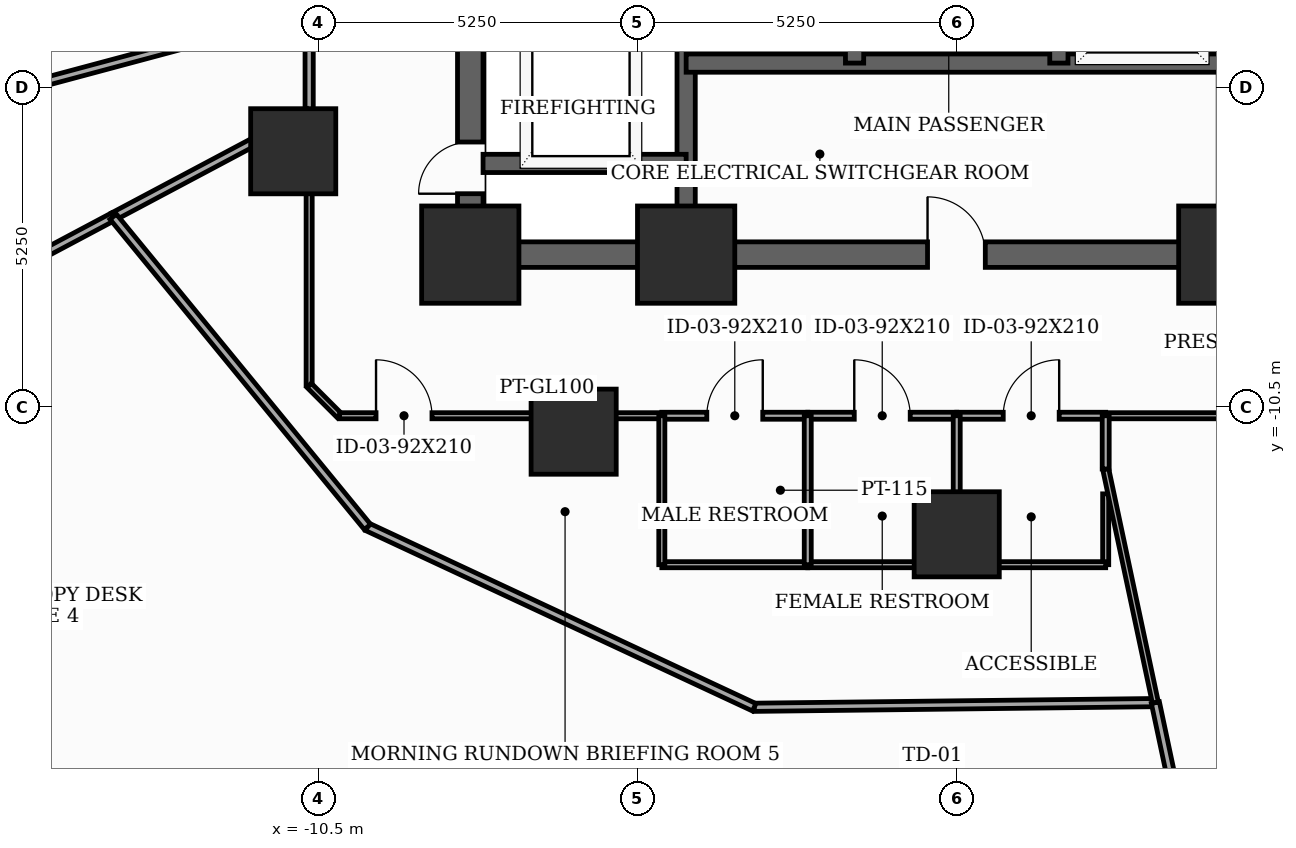
"""IFC4 building model, lengths in metres.
Left out: names, types, materials, properties, quantities, classifications, styles, units other than length and angle.
Written with IfcOpenShell. Run it as: python <this file> out.ifc"""

import sys

from ifc_helpers import new_model, si_unit, direction, frame, frame_2d, origin, origin_2d, place, context, subcontext, project, spatial, rectangle, extrude, element, fill, save


model = new_model("IFC4")
c1 = context("Model", 3, precision=1e-05, world=origin(), true_north=direction((0.0, 1.0)))
c2 = subcontext(c1, "Body", "Model", "MODEL_VIEW")
j1 = project(units=[si_unit("LENGTHUNIT", "METRE"), si_unit("PLANEANGLEUNIT", "RADIAN")], contexts=[c1])
p1 = place(None, origin())
s1 = spatial("IfcSite", under=j1, at=p1, CompositionType="ELEMENT")
p2 = place(p1, origin())
s2 = spatial("IfcBuilding", under=s1, at=p2, CompositionType="ELEMENT")
p3 = place(p2, frame((0.0, 0.0, 29.7)))
s3 = spatial("IfcBuildingStorey", under=s2, at=p3, CompositionType="ELEMENT", Elevation=29.7)
for number, where, z_axis, x_axis in (
    (1, (-8.0, -8.0, 0.0), (0.0, 0.0, 1.0), (1.0, 0.0, 0.0)),
    (2, (-4.45, -8.0, 0.0), (0.0, 0.0, 1.0), (1.0, 0.0, 0.0)),
    (3, (4.45, -8.0, 0.0), (0.0, 0.0, 1.0), (1.0, 0.0, 0.0)),
):
    element("IfcColumn", number, at=place(p3, frame(where, z_axis=z_axis, x_axis=x_axis)), inside=s3, PredefinedType="COLUMN", context=c2, shape_type="SweptSolid", body=[
        extrude(rectangle(XDim=1.6, YDim=1.6, at=origin_2d()), origin(), (0.0, 0.0, 1.0), 3.7),
    ])
for number, where, z_axis, x_axis in (
    (4, (-10.912, -6.3, 0.0), (0.0, 0.0, 1.0), (1.0, 0.0, 0.0)),
    (5, (-6.3, -10.912, 0.0), (0.0, 0.0, 1.0), (1.0, 0.0, 0.0)),
    (6, (0.0, -12.6, 0.0), (0.0, 0.0, 1.0), (1.0, 0.0, 0.0)),
):
    element("IfcColumn", number, at=place(p3, frame(where, z_axis=z_axis, x_axis=x_axis)), inside=s3, PredefinedType="COLUMN", context=c2, shape_type="SweptSolid", body=[
        extrude(rectangle(XDim=1.4, YDim=1.4, at=origin_2d()), origin(), (0.0, 0.0, 1.0), 3.7),
    ])
p4 = place(p3, frame((-8.0, -8.0, 0.0), z_axis=(0.0, 0.0, 1.0), x_axis=(0.0, 1.0, 0.0)))
e7 = element("IfcWall", 7, at=p4, inside=s3, PredefinedType="SHEAR", context=c2, shape_type="SweptSolid", body=[
    extrude(rectangle(XDim=16.0, YDim=0.42, at=frame_2d((8.0, 0.0))), origin(), (0.0, 0.0, 1.0), 3.5),
])
p5 = place(p4, frame((1.002, 0.0, 0.0)))
e8 = element("IfcOpeningElement", 8, at=p5, cuts=e7, PredefinedType="OPENING", context=c2, shape_type="SweptSolid", body=[
    extrude(rectangle(XDim=0.85, YDim=2.02, at=frame_2d((0.425, 1.01))), frame((0.0, 0.22, 0.0), z_axis=(0.0, -1.0, 0.0), x_axis=(1.0, 0.0, 0.0)), (0.0, 0.0, 1.0), 0.44),
])
p6 = place(p4, frame((5.35, 0.0, 0.0)))
e9 = element("IfcOpeningElement", 9, at=p6, cuts=e7, PredefinedType="OPENING", context=c2, shape_type="SweptSolid", body=[
    extrude(rectangle(XDim=1.05, YDim=2.15, at=frame_2d((0.525, 1.075))), frame((0.0, 0.22, 0.0), z_axis=(0.0, -1.0, 0.0), x_axis=(1.0, 0.0, 0.0)), (0.0, 0.0, 1.0), 0.44),
])
p7 = place(p3, frame((-8.0, -8.0, 0.0), z_axis=(0.0, 0.0, 1.0), x_axis=(1.0, 0.0, 0.0)))
e10 = element("IfcWall", 10, at=p7, inside=s3, PredefinedType="SHEAR", context=c2, shape_type="SweptSolid", body=[
    extrude(rectangle(XDim=16.0, YDim=0.42, at=frame_2d((8.0, 0.0))), origin(), (0.0, 0.0, 1.0), 3.5),
])
p8 = place(p7, frame((7.52, 0.0, 0.0)))
e11 = element("IfcOpeningElement", 11, at=p8, cuts=e10, PredefinedType="OPENING", context=c2, shape_type="SweptSolid", body=[
    extrude(rectangle(XDim=0.95, YDim=2.1, at=frame_2d((0.475, 1.05))), frame((0.0, 0.22, 0.0), z_axis=(0.0, -1.0, 0.0), x_axis=(1.0, 0.0, 0.0)), (0.0, 0.0, 1.0), 0.44),
])
p9 = place(p3, frame((-4.45, -7.79, 0.0), z_axis=(0.0, 0.0, 1.0), x_axis=(0.0, 1.0, 0.0)))
e12 = element("IfcWall", 12, at=p9, inside=s3, PredefinedType="SHEAR", context=c2, shape_type="SweptSolid", body=[
    extrude(rectangle(XDim=15.58, YDim=0.3, at=frame_2d((7.79, 0.0))), origin(), (0.0, 0.0, 1.0), 3.5),
])
p10 = place(p3, frame((-7.79, -6.5, 0.0), z_axis=(0.0, 0.0, 1.0), x_axis=(1.0, 0.0, 0.0)))
e13 = element("IfcWall", 13, at=p10, inside=s3, PredefinedType="SHEAR", context=c2, shape_type="SweptSolid", body=[
    extrude(rectangle(XDim=3.34, YDim=0.3, at=frame_2d((1.67, 0.0))), origin(), (0.0, 0.0, 1.0), 3.5),
])
p11 = place(p3, frame((-4.45, -4.85, 0.0), z_axis=(0.0, 0.0, 1.0), x_axis=(1.0, 0.0, 0.0)))
e14 = element("IfcWall", 14, at=p11, inside=s3, PredefinedType="SHEAR", context=c2, shape_type="SweptSolid", body=[
    extrude(rectangle(XDim=8.9, YDim=0.3, at=frame_2d((4.45, 0.0))), origin(), (0.0, 0.0, 1.0), 3.5),
])
p12 = place(p3, frame((-1.68, -4.85, 0.0), z_axis=(0.0, 0.0, 1.0), x_axis=(0.0, 1.0, 0.0)))
e15 = element("IfcWall", 15, at=p12, inside=s3, PredefinedType="SHEAR", context=c2, shape_type="SweptSolid", body=[
    extrude(rectangle(XDim=12.64, YDim=0.3, at=frame_2d((6.32, 0.0))), origin(), (0.0, 0.0, 1.0), 3.5),
])
p13 = place(p12, frame((3.95, 0.0, 0.0)))
e16 = element("IfcOpeningElement", 16, at=p13, cuts=e15, PredefinedType="OPENING", context=c2, shape_type="SweptSolid", body=[
    extrude(rectangle(XDim=1.1, YDim=2.1, at=frame_2d((0.55, 1.05))), frame((0.0, 0.16, 0.0), z_axis=(0.0, -1.0, 0.0), x_axis=(1.0, 0.0, 0.0)), (0.0, 0.0, 1.0), 0.32),
])
p14 = place(p12, frame((6.25, 0.0, 0.0)))
e17 = element("IfcOpeningElement", 17, at=p14, cuts=e15, PredefinedType="OPENING", context=c2, shape_type="SweptSolid", body=[
    extrude(rectangle(XDim=1.1, YDim=2.1, at=frame_2d((0.55, 1.05))), frame((0.0, 0.16, 0.0), z_axis=(0.0, -1.0, 0.0), x_axis=(1.0, 0.0, 0.0)), (0.0, 0.0, 1.0), 0.32),
])
p15 = place(p12, frame((8.55, 0.0, 0.0)))
e18 = element("IfcOpeningElement", 18, at=p15, cuts=e15, PredefinedType="OPENING", context=c2, shape_type="SweptSolid", body=[
    extrude(rectangle(XDim=1.1, YDim=2.1, at=frame_2d((0.55, 1.05))), frame((0.0, 0.16, 0.0), z_axis=(0.0, -1.0, 0.0), x_axis=(1.0, 0.0, 0.0)), (0.0, 0.0, 1.0), 0.32),
])
p16 = place(p12, frame((10.85, 0.0, 0.0)))
e19 = element("IfcOpeningElement", 19, at=p16, cuts=e15, PredefinedType="OPENING", context=c2, shape_type="SweptSolid", body=[
    extrude(rectangle(XDim=1.1, YDim=2.1, at=frame_2d((0.55, 1.05))), frame((0.0, 0.16, 0.0), z_axis=(0.0, -1.0, 0.0), x_axis=(1.0, 0.0, 0.0)), (0.0, 0.0, 1.0), 0.32),
])
p17 = place(p12, frame((1.15, 0.0, 0.0)))
e20 = element("IfcOpeningElement", 20, at=p17, cuts=e15, PredefinedType="OPENING", context=c2, shape_type="SweptSolid", body=[
    extrude(rectangle(XDim=0.92, YDim=2.1, at=frame_2d((0.46, 1.05))), frame((0.0, 0.16, 0.0), z_axis=(0.0, -1.0, 0.0), x_axis=(1.0, 0.0, 0.0)), (0.0, 0.0, 1.0), 0.32),
])
p18 = place(p3, frame((1.68, -4.85, 0.0), z_axis=(0.0, 0.0, 1.0), x_axis=(0.0, 1.0, 0.0)))
e21 = element("IfcWall", 21, at=p18, inside=s3, PredefinedType="SHEAR", context=c2, shape_type="SweptSolid", body=[
    extrude(rectangle(XDim=12.64, YDim=0.3, at=frame_2d((6.32, 0.0))), origin(), (0.0, 0.0, 1.0), 3.5),
])
p19 = place(p18, frame((0.55, 0.0, 0.0)))
e22 = element("IfcOpeningElement", 22, at=p19, cuts=e21, PredefinedType="OPENING", context=c2, shape_type="SweptSolid", body=[
    extrude(rectangle(XDim=1.1, YDim=2.1, at=frame_2d((0.55, 1.05))), frame((0.0, 0.16, 0.0), z_axis=(0.0, -1.0, 0.0), x_axis=(1.0, 0.0, 0.0)), (0.0, 0.0, 1.0), 0.32),
])
p20 = place(p18, frame((2.65, 0.0, 0.0)))
e23 = element("IfcOpeningElement", 23, at=p20, cuts=e21, PredefinedType="OPENING", context=c2, shape_type="SweptSolid", body=[
    extrude(rectangle(XDim=1.1, YDim=2.1, at=frame_2d((0.55, 1.05))), frame((0.0, 0.16, 0.0), z_axis=(0.0, -1.0, 0.0), x_axis=(1.0, 0.0, 0.0)), (0.0, 0.0, 1.0), 0.32),
])
p21 = place(p18, frame((4.75, 0.0, 0.0)))
e24 = element("IfcOpeningElement", 24, at=p21, cuts=e21, PredefinedType="OPENING", context=c2, shape_type="SweptSolid", body=[
    extrude(rectangle(XDim=1.1, YDim=2.1, at=frame_2d((0.55, 1.05))), frame((0.0, 0.16, 0.0), z_axis=(0.0, -1.0, 0.0), x_axis=(1.0, 0.0, 0.0)), (0.0, 0.0, 1.0), 0.32),
])
p22 = place(p18, frame((6.85, 0.0, 0.0)))
e25 = element("IfcOpeningElement", 25, at=p22, cuts=e21, PredefinedType="OPENING", context=c2, shape_type="SweptSolid", body=[
    extrude(rectangle(XDim=1.1, YDim=2.1, at=frame_2d((0.55, 1.05))), frame((0.0, 0.16, 0.0), z_axis=(0.0, -1.0, 0.0), x_axis=(1.0, 0.0, 0.0)), (0.0, 0.0, 1.0), 0.32),
])
p23 = place(p18, frame((8.95, 0.0, 0.0)))
e26 = element("IfcOpeningElement", 26, at=p23, cuts=e21, PredefinedType="OPENING", context=c2, shape_type="SweptSolid", body=[
    extrude(rectangle(XDim=1.1, YDim=2.1, at=frame_2d((0.55, 1.05))), frame((0.0, 0.16, 0.0), z_axis=(0.0, -1.0, 0.0), x_axis=(1.0, 0.0, 0.0)), (0.0, 0.0, 1.0), 0.32),
])
p24 = place(p18, frame((11.05, 0.0, 0.0)))
e27 = element("IfcOpeningElement", 27, at=p24, cuts=e21, PredefinedType="OPENING", context=c2, shape_type="SweptSolid", body=[
    extrude(rectangle(XDim=1.1, YDim=2.1, at=frame_2d((0.55, 1.05))), frame((0.0, 0.16, 0.0), z_axis=(0.0, -1.0, 0.0), x_axis=(1.0, 0.0, 0.0)), (0.0, 0.0, 1.0), 0.32),
])
p25 = place(p3, frame((-10.65, -1.715, 0.0), z_axis=(0.0, 0.0, 1.0), x_axis=(-0.965926659449, -0.258815935688, 0.0)))
e28 = element("IfcWall", 28, at=p25, inside=s3, PredefinedType="PARTITIONING", context=c2, shape_type="SweptSolid", body=[
    extrude(rectangle(XDim=11.87, YDim=0.135, at=frame_2d((5.935, 0.0))), origin(), (0.0, 0.0, 1.0), 2.785),
])
p26 = place(p25, frame((5.46, 0.0, 0.0)))
e29 = element("IfcOpeningElement", 29, at=p26, cuts=e28, PredefinedType="OPENING", context=c2, shape_type="SweptSolid", body=[
    extrude(rectangle(XDim=0.95, YDim=2.1, at=frame_2d((0.475, 1.05))), frame((0.0, 0.077, 0.0), z_axis=(0.0, -1.0, 0.0), x_axis=(1.0, 0.0, 0.0)), (0.0, 0.0, 1.0), 0.155),
])
p27 = place(p3, frame((-21.545, -6.912, 0.0), z_axis=(0.0, 0.0, 1.0), x_axis=(0.965906888357, 0.258889712088, 0.0)))
e30 = element("IfcWall", 30, at=p27, inside=s3, PredefinedType="PARTITIONING", context=c2, shape_type="SweptSolid", body=[
    extrude(rectangle(XDim=11.28, YDim=0.135, at=frame_2d((5.64, 0.0))), origin(), (0.0, 0.0, 1.0), 2.785),
])
p28 = place(p3, frame((-10.65, -3.992, 0.0), z_axis=(0.0, 0.0, 1.0), x_axis=(0.0, -1.0, 0.0)))
e31 = element("IfcWall", 31, at=p28, inside=s3, PredefinedType="PARTITIONING", context=c2, shape_type="SweptSolid", body=[
    extrude(rectangle(XDim=1.671, YDim=0.135, at=frame_2d((0.835, 0.0))), origin(), (0.0, 0.0, 1.0), 3.5),
])
p29 = place(p3, frame((-10.65, -5.663, 0.0), z_axis=(0.0, 0.0, 1.0), x_axis=(0.0, -1.0, 0.0)))
e32 = element("IfcWall", 32, at=p29, inside=s3, PredefinedType="MOVABLE", context=c2, shape_type="SweptSolid", body=[
    extrude(rectangle(XDim=4.487, YDim=0.1, at=frame_2d((2.243, 0.0))), origin(), (0.0, 0.0, 1.0), 2.785),
])
p30 = place(p3, frame((-10.65, -10.15, 0.0), z_axis=(0.0, 0.0, 1.0), x_axis=(0.707106781187, -0.707106781187, 0.0)))
e33 = element("IfcWall", 33, at=p30, inside=s3, PredefinedType="MOVABLE", context=c2, shape_type="SweptSolid", body=[
    extrude(rectangle(XDim=0.707, YDim=0.1, at=frame_2d((0.354, 0.0))), origin(), (0.0, 0.0, 1.0), 3.5),
])
p31 = place(p3, frame((-10.15, -10.65, 0.0), z_axis=(0.0, 0.0, 1.0), x_axis=(1.0, 0.0, 0.0)))
e34 = element("IfcWall", 34, at=p31, inside=s3, PredefinedType="MOVABLE", context=c2, shape_type="SweptSolid", body=[
    extrude(rectangle(XDim=5.3, YDim=0.1, at=frame_2d((2.65, 0.0))), origin(), (0.0, 0.0, 1.0), 2.785),
])
p32 = place(p31, frame((0.6, 0.0, 0.0)))
e35 = element("IfcOpeningElement", 35, at=p32, cuts=e34, PredefinedType="OPENING", context=c2, shape_type="SweptSolid", body=[
    extrude(rectangle(XDim=0.92, YDim=2.1, at=frame_2d((0.46, 1.05))), frame((0.0, 0.06, 0.0), z_axis=(0.0, -1.0, 0.0), x_axis=(1.0, 0.0, 0.0)), (0.0, 0.0, 1.0), 0.12),
])
p33 = place(p3, frame((-4.85, -10.65, 0.0), z_axis=(0.0, 0.0, 1.0), x_axis=(1.0, 0.0, 0.0)))
e36 = element("IfcWall", 36, at=p33, inside=s3, PredefinedType="PARTITIONING", context=c2, shape_type="SweptSolid", body=[
    extrude(rectangle(XDim=2.4, YDim=0.115, at=frame_2d((1.2, 0.0))), origin(), (0.0, 0.0, 1.0), 3.5),
])
p34 = place(p33, frame((0.74, 0.0, 0.0)))
e37 = element("IfcOpeningElement", 37, at=p34, cuts=e36, PredefinedType="OPENING", context=c2, shape_type="SweptSolid", body=[
    extrude(rectangle(XDim=0.92, YDim=2.1, at=frame_2d((0.46, 1.05))), frame((0.0, 0.067, 0.0), z_axis=(0.0, -1.0, 0.0), x_axis=(1.0, 0.0, 0.0)), (0.0, 0.0, 1.0), 0.135),
])
p35 = place(p3, frame((-2.45, -10.65, 0.0), z_axis=(0.0, 0.0, 1.0), x_axis=(1.0, 0.0, 0.0)))
e38 = element("IfcWall", 38, at=p35, inside=s3, PredefinedType="PARTITIONING", context=c2, shape_type="SweptSolid", body=[
    extrude(rectangle(XDim=2.45, YDim=0.115, at=frame_2d((1.225, 0.0))), origin(), (0.0, 0.0, 1.0), 2.785),
])
p36 = place(p35, frame((0.765, 0.0, 0.0)))
e39 = element("IfcOpeningElement", 39, at=p36, cuts=e38, PredefinedType="OPENING", context=c2, shape_type="SweptSolid", body=[
    extrude(rectangle(XDim=0.92, YDim=2.1, at=frame_2d((0.46, 1.05))), frame((0.0, 0.067, 0.0), z_axis=(0.0, -1.0, 0.0), x_axis=(1.0, 0.0, 0.0)), (0.0, 0.0, 1.0), 0.135),
])
p37 = place(p3, frame((0.0, -10.65, 0.0), z_axis=(0.0, 0.0, 1.0), x_axis=(1.0, 0.0, 0.0)))
e40 = element("IfcWall", 40, at=p37, inside=s3, PredefinedType="PARTITIONING", context=c2, shape_type="SweptSolid", body=[
    extrude(rectangle(XDim=2.45, YDim=0.115, at=frame_2d((1.225, 0.0))), origin(), (0.0, 0.0, 1.0), 3.5),
])
p38 = place(p37, frame((0.765, 0.0, 0.0)))
e41 = element("IfcOpeningElement", 41, at=p38, cuts=e40, PredefinedType="OPENING", context=c2, shape_type="SweptSolid", body=[
    extrude(rectangle(XDim=0.92, YDim=2.1, at=frame_2d((0.46, 1.05))), frame((0.0, 0.067, 0.0), z_axis=(0.0, -1.0, 0.0), x_axis=(1.0, 0.0, 0.0)), (0.0, 0.0, 1.0), 0.135),
])
p39 = place(p3, frame((2.45, -10.65, 0.0), z_axis=(0.0, 0.0, 1.0), x_axis=(1.0, 0.0, 0.0)))
e42 = element("IfcWall", 42, at=p39, inside=s3, PredefinedType="MOVABLE", context=c2, shape_type="SweptSolid", body=[
    extrude(rectangle(XDim=7.7, YDim=0.1, at=frame_2d((3.85, 0.0))), origin(), (0.0, 0.0, 1.0), 2.785),
])
p40 = place(p3, frame((-29.498, -15.684, 0.0), z_axis=(0.0, 0.0, 1.0), x_axis=(0.882944182352, 0.46947797696, 0.0)))
e43 = element("IfcWall", 43, at=p40, inside=s3, PredefinedType="PARTITIONING", context=c2, shape_type="SweptSolid", body=[
    extrude(rectangle(XDim=17.697, YDim=0.135, at=frame_2d((8.848, 0.0))), origin(), (0.0, 0.0, 1.0), 2.935),
])
p41 = place(p40, frame((8.388, 0.0, 0.0)))
e44 = element("IfcOpeningElement", 44, at=p41, cuts=e43, PredefinedType="OPENING", context=c2, shape_type="SweptSolid", body=[
    extrude(rectangle(XDim=0.92, YDim=2.1, at=frame_2d((0.46, 1.05))), frame((0.0, 0.077, 0.0), z_axis=(0.0, -1.0, 0.0), x_axis=(1.0, 0.0, 0.0)), (0.0, 0.0, 1.0), 0.155),
])
p42 = place(p3, frame((-13.873, -7.376, 0.0), z_axis=(0.0, 0.0, 1.0), x_axis=(0.883048160598, 0.469282373486, 0.0)))
e45 = element("IfcWall", 45, at=p42, inside=s3, PredefinedType="PARTITIONING", context=c2, shape_type="SweptSolid", body=[
    extrude(rectangle(XDim=3.65, YDim=0.135, at=frame_2d((1.825, 0.0))), origin(), (0.0, 0.0, 1.0), 2.785),
])
p43 = place(p3, frame((3.267, -15.368, 0.0), z_axis=(0.0, 0.0, 1.0), x_axis=(-0.999931630146, -0.011693375588, 0.0)))
e46 = element("IfcWall", 46, at=p43, inside=s3, PredefinedType="PARTITIONING", context=c2, shape_type="SweptSolid", body=[
    extrude(rectangle(XDim=6.598, YDim=0.135, at=frame_2d((3.299, 0.0))), origin(), (0.0, 0.0, 1.0), 3.5),
])
p44 = place(p3, frame((-3.33, -15.445, 0.0), z_axis=(0.0, 0.0, 1.0), x_axis=(-0.90631018164, 0.422613126458, 0.0)))
e47 = element("IfcWall", 47, at=p44, inside=s3, PredefinedType="PARTITIONING", context=c2, shape_type="SweptSolid", body=[
    extrude(rectangle(XDim=7.018, YDim=0.135, at=frame_2d((3.509, 0.0))), origin(), (0.0, 0.0, 1.0), 2.685),
])
p45 = place(p3, frame((-9.691, -12.479, 0.0), z_axis=(0.0, 0.0, 1.0), x_axis=(-0.633866270814, 0.773442661562, 0.0)))
e48 = element("IfcWall", 48, at=p45, inside=s3, PredefinedType="PARTITIONING", context=c2, shape_type="SweptSolid", body=[
    extrude(rectangle(XDim=6.598, YDim=0.135, at=frame_2d((3.299, 0.0))), origin(), (0.0, 0.0, 1.0), 3.5),
])
p46 = place(p3, frame((4.003, -18.837, 0.0), z_axis=(0.0, 0.0, 1.0), x_axis=(-0.207633969896, 0.978206590933, 0.0)))
e49 = element("IfcWall", 49, at=p46, inside=s3, PredefinedType="PARTITIONING", context=c2, shape_type="SweptSolid", body=[
    extrude(rectangle(XDim=3.546, YDim=0.135, at=frame_2d((1.773, 0.0))), origin(), (0.0, 0.0, 1.0), 2.935),
])
p47 = place(p3, frame((-2.45, -13.1, 0.0), z_axis=(0.0, 0.0, 1.0), x_axis=(-1.0, 0.0, 0.0)))
e50 = element("IfcWall", 50, at=p47, inside=s3, PredefinedType="MOVABLE", context=c2, shape_type="SweptSolid", body=[
    extrude(rectangle(XDim=2.4, YDim=0.1, at=frame_2d((1.2, 0.0))), origin(), (0.0, 0.0, 1.0), 3.5),
])
p48 = place(p3, frame((-4.85, -13.1, 0.0), z_axis=(0.0, 0.0, 1.0), x_axis=(0.0, 1.0, 0.0)))
e51 = element("IfcWall", 51, at=p48, inside=s3, PredefinedType="MOVABLE", context=c2, shape_type="SweptSolid", body=[
    extrude(rectangle(XDim=2.45, YDim=0.1, at=frame_2d((1.225, 0.0))), origin(), (0.0, 0.0, 1.0), 2.785),
])
p49 = place(p3, frame((0.0, -13.1, 0.0), z_axis=(0.0, 0.0, 1.0), x_axis=(-1.0, 0.0, 0.0)))
e52 = element("IfcWall", 52, at=p49, inside=s3, PredefinedType="MOVABLE", context=c2, shape_type="SweptSolid", body=[
    extrude(rectangle(XDim=2.45, YDim=0.1, at=frame_2d((1.225, 0.0))), origin(), (0.0, 0.0, 1.0), 3.5),
])
p50 = place(p3, frame((2.45, -11.935, 0.0), z_axis=(0.0, 0.0, 1.0), x_axis=(0.0, -1.0, 0.0)))
e53 = element("IfcWall", 53, at=p50, inside=s3, PredefinedType="MOVABLE", context=c2, shape_type="SweptSolid", body=[
    extrude(rectangle(XDim=1.166, YDim=0.1, at=frame_2d((0.583, 0.0))), origin(), (0.0, 0.0, 1.0), 2.785),
])
p51 = place(p3, frame((2.45, -13.1, 0.0), z_axis=(0.0, 0.0, 1.0), x_axis=(-1.0, 0.0, 0.0)))
e54 = element("IfcWall", 54, at=p51, inside=s3, PredefinedType="MOVABLE", context=c2, shape_type="SweptSolid", body=[
    extrude(rectangle(XDim=2.45, YDim=0.1, at=frame_2d((1.225, 0.0))), origin(), (0.0, 0.0, 1.0), 3.5),
])
p52 = place(p3, frame((3.267, -15.368, 0.0), z_axis=(0.0, 0.0, 1.0), x_axis=(-0.208030469109, 0.978122346091, 0.0)))
e55 = element("IfcWall", 55, at=p52, inside=s3, PredefinedType="MOVABLE", context=c2, shape_type="SweptSolid", body=[
    extrude(rectangle(XDim=3.928, YDim=0.1, at=frame_2d((1.964, 0.0))), origin(), (0.0, 0.0, 1.0), 2.785),
])
for number, where, z_axis, x_axis in (
    (56, (-2.45, -13.1, 0.0), (0.0, 0.0, 1.0), (0.0, 1.0, 0.0)),
    (57, (0.0, -13.1, 0.0), (0.0, 0.0, 1.0), (0.0, 1.0, 0.0)),
):
    element("IfcWall", number, at=place(p3, frame(where, z_axis=z_axis, x_axis=x_axis)), inside=s3, PredefinedType="PARTITIONING", context=c2, shape_type="SweptSolid", body=[
        extrude(rectangle(XDim=2.45, YDim=0.115, at=frame_2d((1.225, 0.0))), origin(), (0.0, 0.0, 1.0), 2.785),
    ])
p53 = place(p3, frame((2.45, -11.526, 0.0), z_axis=(0.0, 0.0, 1.0), x_axis=(0.0, 1.0, 0.0)))
e58 = element("IfcWall", 58, at=p53, inside=s3, PredefinedType="PARTITIONING", context=c2, shape_type="SweptSolid", body=[
    extrude(rectangle(XDim=0.876, YDim=0.115, at=frame_2d((0.438, 0.0))), origin(), (0.0, 0.0, 1.0), 3.5),
])
p54 = place(p5, origin())
e59 = element("IfcDoor", 59, at=p54, inside=s3, OperationType="SINGLE_SWING_LEFT", PredefinedType="TRAPDOOR", context=c2, shape_type="SweptSolid", body=[
    extrude(rectangle(XDim=0.85, YDim=2.02, at=frame_2d((0.425, 1.01))), frame((0.0, 0.025, 0.0), z_axis=(0.0, -1.0, 0.0), x_axis=(1.0, 0.0, 0.0)), (0.0, 0.0, 1.0), 0.05),
])
fill(e8, e59)
p55 = place(p8, origin())
e60 = element("IfcDoor", 60, at=p55, inside=s3, OperationType="SINGLE_SWING_LEFT", PredefinedType="DOOR", context=c2, shape_type="SweptSolid", body=[
    extrude(rectangle(XDim=0.95, YDim=2.1, at=frame_2d((0.475, 1.05))), frame((0.0, 0.025, 0.0), z_axis=(0.0, -1.0, 0.0), x_axis=(1.0, 0.0, 0.0)), (0.0, 0.0, 1.0), 0.05),
])
fill(e11, e60)
p56 = place(p32, origin())
e61 = element("IfcDoor", 61, at=p56, inside=s3, OperationType="SINGLE_SWING_LEFT", PredefinedType="DOOR", context=c2, shape_type="SweptSolid", body=[
    extrude(rectangle(XDim=0.92, YDim=2.1, at=frame_2d((0.46, 1.05))), frame((0.0, 0.025, 0.0), z_axis=(0.0, -1.0, 0.0), x_axis=(1.0, 0.0, 0.0)), (0.0, 0.0, 1.0), 0.05),
])
fill(e35, e61)
p57 = place(p34, origin())
e62 = element("IfcDoor", 62, at=p57, inside=s3, OperationType="SINGLE_SWING_RIGHT", PredefinedType="DOOR", context=c2, shape_type="SweptSolid", body=[
    extrude(rectangle(XDim=0.92, YDim=2.1, at=frame_2d((0.46, 1.05))), frame((0.0, 0.025, 0.0), z_axis=(0.0, -1.0, 0.0), x_axis=(1.0, 0.0, 0.0)), (0.0, 0.0, 1.0), 0.05),
])
fill(e37, e62)
p58 = place(p36, origin())
e63 = element("IfcDoor", 63, at=p58, inside=s3, OperationType="SINGLE_SWING_LEFT", PredefinedType="DOOR", context=c2, shape_type="SweptSolid", body=[
    extrude(rectangle(XDim=0.92, YDim=2.1, at=frame_2d((0.46, 1.05))), frame((0.0, 0.025, 0.0), z_axis=(0.0, -1.0, 0.0), x_axis=(1.0, 0.0, 0.0)), (0.0, 0.0, 1.0), 0.05),
])
fill(e39, e63)
p59 = place(p38, origin())
e64 = element("IfcDoor", 64, at=p59, inside=s3, OperationType="SINGLE_SWING_RIGHT", PredefinedType="DOOR", context=c2, shape_type="SweptSolid", body=[
    extrude(rectangle(XDim=0.92, YDim=2.1, at=frame_2d((0.46, 1.05))), frame((0.0, 0.025, 0.0), z_axis=(0.0, -1.0, 0.0), x_axis=(1.0, 0.0, 0.0)), (0.0, 0.0, 1.0), 0.05),
])
fill(e41, e64)
save(model, sys.argv[1])
